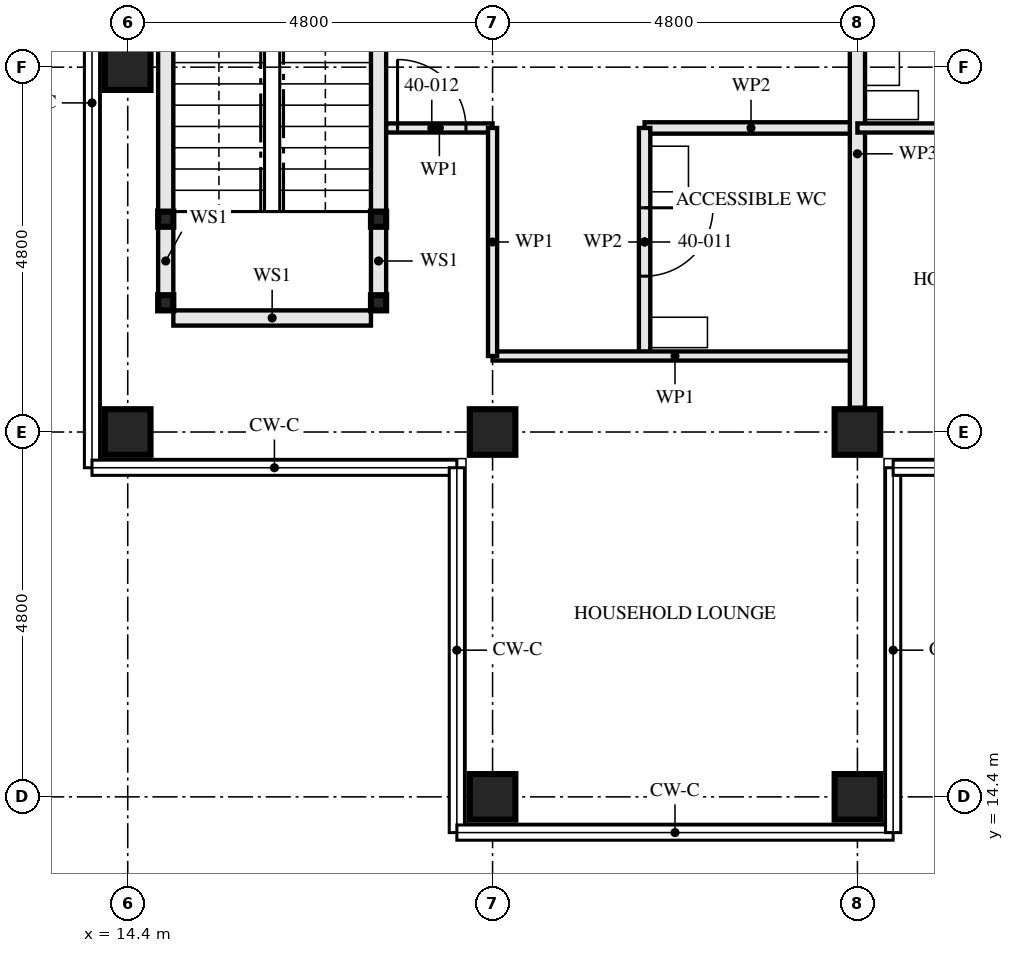
"""IFC4 building model, lengths in metres.
Left out: names, types, materials, properties, quantities, classifications, styles, units other than length and angle.
Written with IfcOpenShell. Run it as: python <this file> out.ifc"""

import sys

from ifc_helpers import new_model, si_unit, direction, frame, frame_2d, origin, origin_2d, place, context, subcontext, project, spatial, rectangle, hollow_rectangle, extrude, element, fill, save


model = new_model("IFC4")
c1 = context("Model", 3, precision=1e-05, world=origin(), true_north=direction((0.0, 1.0)))
c2 = subcontext(c1, "Body", "Model", "MODEL_VIEW")
j1 = project(units=[si_unit("LENGTHUNIT", "METRE"), si_unit("PLANEANGLEUNIT", "RADIAN")], contexts=[c1])
p1 = place(None, origin())
s1 = spatial("IfcSite", under=j1, at=p1, CompositionType="ELEMENT")
p2 = place(p1, origin())
s2 = spatial("IfcBuilding", under=s1, at=p2, CompositionType="ELEMENT")
p3 = place(p2, frame((0.0, 0.0, 148.0)))
s3 = spatial("IfcBuildingStorey", under=s2, at=p3, CompositionType="ELEMENT", Elevation=148.0)
for number, where, z_axis, x_axis in (
    (1, (14.4, 19.2, 0.0), (0.0, 0.0, 1.0), (0.0, 1.0, 0.0)),
    (2, (14.4, 24.0, 0.0), (0.0, 0.0, 1.0), (1.0, 0.0, 0.0)),
    (3, (19.2, 14.4, 0.0), (0.0, 0.0, 1.0), (0.0, 1.0, 0.0)),
    (4, (19.2, 19.2, 0.0), (0.0, 0.0, 1.0), (0.0, 1.0, 0.0)),
    (5, (24.0, 14.4, 0.0), (0.0, 0.0, 1.0), (0.0, 1.0, 0.0)),
    (6, (24.0, 19.2, 0.0), (0.0, 0.0, 1.0), (0.0, 1.0, 0.0)),
):
    element("IfcColumn", number, at=place(p3, frame(where, z_axis=z_axis, x_axis=x_axis)), inside=s3, PredefinedType="COLUMN", context=c2, shape_type="SweptSolid", body=[
        extrude(hollow_rectangle(XDim=0.6, YDim=0.6, WallThickness=0.08, at=origin_2d()), origin(), (0.0, 0.0, 1.0), 3.5),
    ])
for number, where, z_axis, x_axis in (
    (7, (14.9, 20.9, 0.0), (0.0, 0.0, 1.0), (1.0, 0.0, 0.0)),
    (8, (17.7, 20.9, 0.0), (0.0, 0.0, 1.0), (1.0, 0.0, 0.0)),
    (9, (14.9, 22.0, 0.0), (0.0, 0.0, 1.0), (1.0, 0.0, 0.0)),
    (10, (17.7, 22.0, 0.0), (0.0, 0.0, 1.0), (1.0, 0.0, 0.0)),
):
    element("IfcColumn", number, at=place(p3, frame(where, z_axis=z_axis, x_axis=x_axis)), inside=s3, PredefinedType="COLUMN", context=c2, shape_type="SweptSolid", body=[
        extrude(hollow_rectangle(XDim=0.2, YDim=0.2, WallThickness=0.008, at=origin_2d()), origin(), (0.0, 0.0, 1.0), 3.33),
    ])
p4 = place(p3, frame((14.9, 21.0, 0.0), z_axis=(0.0, 0.0, 1.0), x_axis=(0.0, 1.0, 0.0)))
e11 = element("IfcWall", 11, at=p4, inside=s3, PredefinedType="SOLIDWALL", context=c2, shape_type="SweptSolid", body=[
    extrude(rectangle(XDim=0.9, YDim=0.2, at=frame_2d((0.45, 0.0))), origin(), (0.0, 0.0, 1.0), 2.99),
])
p5 = place(p3, frame((14.9, 22.1, 0.0), z_axis=(0.0, 0.0, 1.0), x_axis=(0.0, 1.0, 0.0)))
e12 = element("IfcWall", 12, at=p5, inside=s3, PredefinedType="SOLIDWALL", context=c2, shape_type="SweptSolid", body=[
    extrude(rectangle(XDim=4.7, YDim=0.2, at=frame_2d((2.35, 0.0))), origin(), (0.0, 0.0, 1.0), 2.99),
])
p6 = place(p3, frame((17.7, 21.0, 0.0), z_axis=(0.0, 0.0, 1.0), x_axis=(0.0, 1.0, 0.0)))
e13 = element("IfcWall", 13, at=p6, inside=s3, PredefinedType="SOLIDWALL", context=c2, shape_type="SweptSolid", body=[
    extrude(rectangle(XDim=0.9, YDim=0.2, at=frame_2d((0.45, 0.0))), origin(), (0.0, 0.0, 1.0), 2.99),
])
p7 = place(p3, frame((17.7, 22.1, 0.0), z_axis=(0.0, 0.0, 1.0), x_axis=(0.0, 1.0, 0.0)))
e14 = element("IfcWall", 14, at=p7, inside=s3, PredefinedType="SOLIDWALL", context=c2, shape_type="SweptSolid", body=[
    extrude(rectangle(XDim=4.7, YDim=0.2, at=frame_2d((2.35, 0.0))), origin(), (0.0, 0.0, 1.0), 2.99),
])
p8 = place(p3, frame((15.0, 20.7, 0.0), z_axis=(0.0, 0.0, 1.0), x_axis=(1.0, 0.0, 0.0)))
e15 = element("IfcWall", 15, at=p8, inside=s3, PredefinedType="SOLIDWALL", context=c2, shape_type="SweptSolid", body=[
    extrude(rectangle(XDim=2.6, YDim=0.2, at=frame_2d((1.3, 0.0))), origin(), (0.0, 0.0, 1.0), 3.33),
])
p9 = place(p3, frame((21.2, 20.2, 0.0), z_axis=(0.0, 0.0, 1.0), x_axis=(0.0, 1.0, 0.0)))
e16 = element("IfcWall", 16, at=p9, inside=s3, PredefinedType="PARTITIONING", context=c2, shape_type="SweptSolid", body=[
    extrude(rectangle(XDim=3.0, YDim=0.15, at=frame_2d((1.5, 0.0))), origin(), (0.0, 0.0, 1.0), 3.33),
])
p10 = place(p9, frame((1.05, 0.0, 0.0)))
e17 = element("IfcOpeningElement", 17, at=p10, cuts=e16, PredefinedType="OPENING", context=c2, shape_type="SweptSolid", body=[
    extrude(rectangle(XDim=0.9, YDim=2.1, at=frame_2d((0.45, 1.05))), frame((0.0, 0.085, 0.0), z_axis=(0.0, -1.0, 0.0), x_axis=(1.0, 0.0, 0.0)), (0.0, 0.0, 1.0), 0.171),
])
p11 = place(p3, frame((21.2, 23.2, 0.0), z_axis=(0.0, 0.0, 1.0), x_axis=(1.0, 0.0, 0.0)))
e18 = element("IfcWall", 18, at=p11, inside=s3, PredefinedType="PARTITIONING", context=c2, shape_type="SweptSolid", body=[
    extrude(rectangle(XDim=2.8, YDim=0.15, at=frame_2d((1.4, 0.0))), origin(), (0.0, 0.0, 1.0), 3.33),
])
p12 = place(p3, frame((17.8, 23.2, 0.0), z_axis=(0.0, 0.0, 1.0), x_axis=(1.0, 0.0, 0.0)))
e19 = element("IfcWall", 19, at=p12, inside=s3, PredefinedType="PARTITIONING", context=c2, shape_type="SweptSolid", body=[
    extrude(rectangle(XDim=1.4, YDim=0.12, at=frame_2d((0.7, 0.0))), origin(), (0.0, 0.0, 1.0), 3.33),
])
p13 = place(p12, frame((0.15, 0.0, 0.0)))
e20 = element("IfcOpeningElement", 20, at=p13, cuts=e19, PredefinedType="OPENING", context=c2, shape_type="SweptSolid", body=[
    extrude(rectangle(XDim=0.9, YDim=2.1, at=frame_2d((0.45, 1.05))), frame((0.0, 0.071, 0.0), z_axis=(0.0, -1.0, 0.0), x_axis=(1.0, 0.0, 0.0)), (0.0, 0.0, 1.0), 0.141),
])
p14 = place(p3, frame((19.2, 20.2, 0.0), z_axis=(0.0, 0.0, 1.0), x_axis=(1.0, 0.0, 0.0)))
e21 = element("IfcWall", 21, at=p14, inside=s3, PredefinedType="PARTITIONING", context=c2, shape_type="SweptSolid", body=[
    extrude(rectangle(XDim=4.8, YDim=0.12, at=frame_2d((2.4, 0.0))), origin(), (0.0, 0.0, 1.0), 3.33),
])
p15 = place(p3, frame((19.2, 20.2, 0.0), z_axis=(0.0, 0.0, 1.0), x_axis=(0.0, 1.0, 0.0)))
e22 = element("IfcWall", 22, at=p15, inside=s3, PredefinedType="PARTITIONING", context=c2, shape_type="SweptSolid", body=[
    extrude(rectangle(XDim=3.0, YDim=0.12, at=frame_2d((1.5, 0.0))), origin(), (0.0, 0.0, 1.0), 2.55),
])
p16 = place(p3, frame((24.0, 19.52, 0.0), z_axis=(0.0, 0.0, 1.0), x_axis=(0.0, 1.0, 0.0)))
e23 = element("IfcWall", 23, at=p16, inside=s3, PredefinedType="PARTITIONING", context=c2, shape_type="SweptSolid", body=[
    extrude(rectangle(XDim=6.68, YDim=0.2, at=frame_2d((3.34, 0.0))), origin(), (0.0, 0.0, 1.0), 2.55),
])
p17 = place(p3, frame((24.0, 23.2, 0.0), z_axis=(0.0, 0.0, 1.0), x_axis=(1.0, 0.0, 0.0)))
e24 = element("IfcWall", 24, at=p17, inside=s3, PredefinedType="PARTITIONING", context=c2, shape_type="SweptSolid", body=[
    extrude(rectangle(XDim=5.25, YDim=0.12, at=frame_2d((2.625, 0.0))), origin(), (0.0, 0.0, 1.0), 2.32),
])
p18 = place(p17, frame((2.975, 0.0, 0.0)))
e25 = element("IfcOpeningElement", 25, at=p18, cuts=e24, PredefinedType="OPENING", context=c2, shape_type="SweptSolid", body=[
    extrude(rectangle(XDim=0.9, YDim=2.1, at=frame_2d((0.45, 1.05))), frame((0.0, 0.071, 0.0), z_axis=(0.0, -1.0, 0.0), x_axis=(1.0, 0.0, 0.0)), (0.0, 0.0, 1.0), 0.141),
])
p19 = place(p10, frame((0.9, 0.0, 0.0), z_axis=(0.0, 0.0, 1.0), x_axis=(-1.0, 0.0, 0.0)))
e26 = element("IfcDoor", 26, at=p19, inside=s3, OperationType="SINGLE_SWING_RIGHT", PredefinedType="DOOR", context=c2, shape_type="SweptSolid", body=[
    extrude(rectangle(XDim=0.9, YDim=2.1, at=frame_2d((0.45, 1.05))), frame((0.0, 0.022, 0.0), z_axis=(0.0, -1.0, 0.0), x_axis=(1.0, 0.0, 0.0)), (0.0, 0.0, 1.0), 0.044),
])
fill(e17, e26)
p20 = place(p13, origin())
e27 = element("IfcDoor", 27, at=p20, inside=s3, OperationType="SINGLE_SWING_RIGHT", PredefinedType="DOOR", context=c2, shape_type="SweptSolid", body=[
    extrude(rectangle(XDim=0.9, YDim=2.1, at=frame_2d((0.45, 1.05))), frame((0.0, 0.022, 0.0), z_axis=(0.0, -1.0, 0.0), x_axis=(1.0, 0.0, 0.0)), (0.0, 0.0, 1.0), 0.044),
])
fill(e20, e27)
save(model, sys.argv[1])
